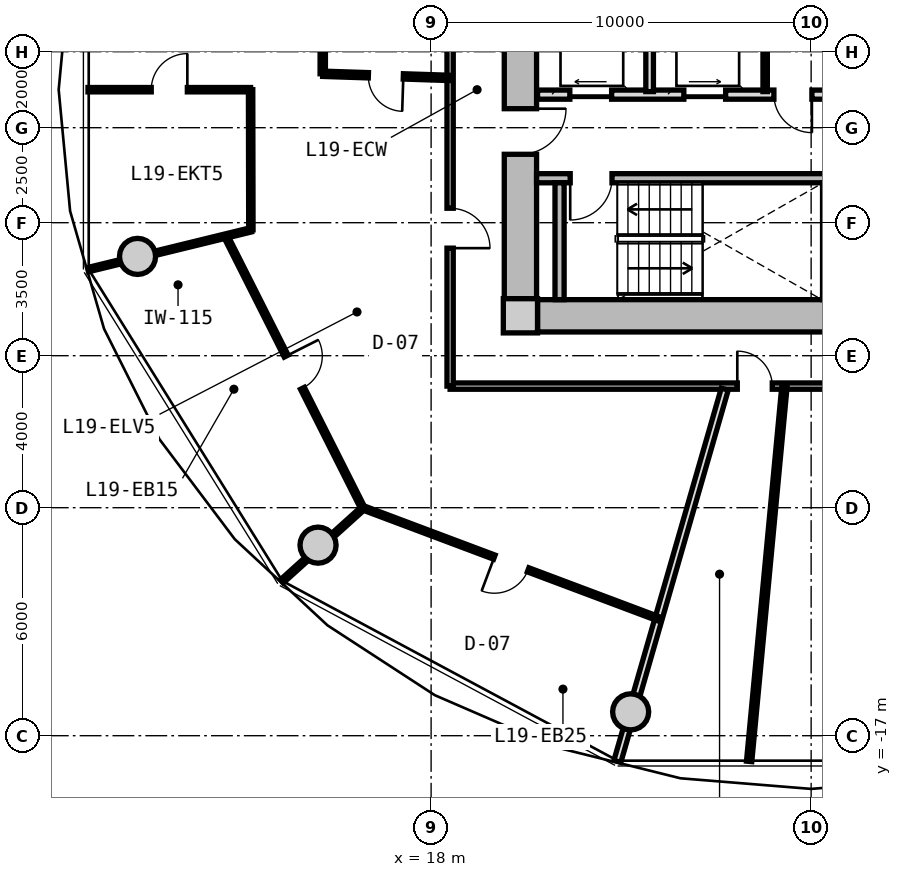
"""IFC4 building model, lengths in metres.
Left out: names, types, materials, properties, quantities, classifications, styles, units other than length and angle.
Written with IfcOpenShell. Run it as: python <this file> out.ifc"""

import sys

from ifc_helpers import new_model, si_unit, direction, frame, frame_2d, origin, origin_2d, place, context, subcontext, project, spatial, rectangle, circle, extrude, source, transform, mapped, element, fill, save


model = new_model("IFC4")
c1 = context("Model", 3, precision=1e-05, world=origin(), true_north=direction((0.0, 1.0)))
c2 = subcontext(c1, "Body", "Model", "MODEL_VIEW")
j1 = project(units=[si_unit("LENGTHUNIT", "METRE"), si_unit("PLANEANGLEUNIT", "RADIAN")], contexts=[c1])
p1 = place(None, origin())
s1 = spatial("IfcSite", under=j1, at=p1, CompositionType="ELEMENT")
p2 = place(p1, origin())
s2 = spatial("IfcBuilding", under=s1, at=p2, CompositionType="ELEMENT")
p3 = place(p2, frame((0.0, 0.0, 64.3)))
s3 = spatial("IfcBuildingStorey", under=s2, at=p3, CompositionType="ELEMENT", Elevation=64.3)
m1 = source(origin(), c2, "Body", "SweptSolid", [
    extrude(rectangle(XDim=0.9, YDim=0.9, at=origin_2d()), origin(), (0.0, 0.0, 1.0), 3.05),
])
p4 = place(p3, frame((20.35, -5.95, 0.0), z_axis=(0.0, 0.0, 1.0), x_axis=(1.0, 0.0, 0.0)))
e1 = element("IfcColumn", 1, at=p4, inside=s3, PredefinedType="COLUMN", context=c2, shape_type="MappedRepresentation", body=[
    mapped(m1, transform((0.0, 0.0, 0.0), x_axis=(1.0, 0.0, 0.0), y_axis=(0.0, 1.0, 0.0), z_axis=(0.0, 0.0, 1.0), scale=1.0)),
])
m2 = source(origin(), c2, "Body", "SweptSolid", [
    extrude(rectangle(XDim=14.4, YDim=0.85, at=frame_2d((7.2, 0.0))), origin(), (0.0, 0.0, 1.0), 2.79),
])
p5 = place(p3, frame((35.2, -5.95, 0.0), z_axis=(0.0, 0.0, 1.0), x_axis=(-1.0, 0.0, 0.0)))
e2 = element("IfcWall", 2, at=p5, inside=s3, PredefinedType="SHEAR", context=c2, shape_type="MappedRepresentation", body=[
    mapped(m2, transform((0.0, 0.0, 0.0), x_axis=(1.0, 0.0, 0.0), y_axis=(0.0, 1.0, 0.0), z_axis=(0.0, 0.0, 1.0), scale=1.0)),
])
m3 = source(origin(), c2, "Body", "SweptSolid", [
    extrude(rectangle(XDim=11.0, YDim=0.85, at=frame_2d((5.5, 0.0))), origin(), (0.0, 0.0, 1.0), 2.79),
])
p6 = place(p3, frame((20.35, -5.5, 0.0), z_axis=(0.0, 0.0, 1.0), x_axis=(0.0, 1.0, 0.0)))
e3 = element("IfcWall", 3, at=p6, inside=s3, PredefinedType="SHEAR", context=c2, shape_type="MappedRepresentation", body=[
    mapped(m3, transform((0.0, 0.0, 0.0), x_axis=(1.0, 0.0, 0.0), y_axis=(0.0, 1.0, 0.0), z_axis=(0.0, 0.0, 1.0), scale=1.0)),
])
p7 = place(p6, frame((3.8, 0.0, 0.0)))
e4 = element("IfcOpeningElement", 4, at=p7, cuts=e3, PredefinedType="OPENING", context=c2, shape_type="SweptSolid", body=[
    extrude(rectangle(XDim=1.2, YDim=2.15, at=frame_2d((0.6, 1.075))), frame((0.0, 0.435, 0.0), z_axis=(0.0, -1.0, 0.0), x_axis=(1.0, 0.0, 0.0)), (0.0, 0.0, 1.0), 0.87),
])
m4 = source(origin(), c2, "Body", "SweptSolid", [
    extrude(circle(Radius=0.475, at=origin_2d()), origin(), (0.0, 0.0, 1.0), 3.05),
])
for number, where, z_axis, x_axis in (
    (5, (10.275, -4.387, 0.0), (0.0, 0.0, 1.0), (1.0, 0.0, 0.0)),
    (6, (15.025, -11.985, 0.0), (0.0, 0.0, 1.0), (1.0, 0.0, 0.0)),
    (7, (23.251, -16.373, 0.0), (0.0, 0.0, 1.0), (1.0, 0.0, 0.0)),
):
    element("IfcColumn", number, at=place(p3, frame(where, z_axis=z_axis, x_axis=x_axis)), inside=s3, PredefinedType="COLUMN", context=c2, shape_type="MappedRepresentation", body=[
        mapped(m4, transform((0.0, 0.0, 0.0), x_axis=(1.0, 0.0, 0.0), y_axis=(0.0, 1.0, 0.0), z_axis=(0.0, 0.0, 1.0), scale=1.0)),
    ])
m5 = source(origin(), c2, "Body", "SweptSolid", [
    extrude(rectangle(XDim=7.765, YDim=0.24, at=frame_2d((3.883, 0.0))), origin(), (0.0, 0.0, 1.0), 2.79),
])
p8 = place(p3, frame((20.775, -2.33, 0.0), z_axis=(0.0, 0.0, 1.0), x_axis=(1.0, 0.0, 0.0)))
e8 = element("IfcWall", 8, at=p8, inside=s3, PredefinedType="PARTITIONING", context=c2, shape_type="MappedRepresentation", body=[
    mapped(m5, transform((0.0, 0.0, 0.0), x_axis=(1.0, 0.0, 0.0), y_axis=(0.0, 1.0, 0.0), z_axis=(0.0, 0.0, 1.0), scale=1.0)),
])
p9 = place(p8, frame((0.885, 0.0, 0.0)))
e9 = element("IfcOpeningElement", 9, at=p9, cuts=e8, PredefinedType="OPENING", context=c2, shape_type="SweptSolid", body=[
    extrude(rectangle(XDim=1.1, YDim=2.15, at=frame_2d((0.55, 1.075))), frame((0.0, 0.13, 0.0), z_axis=(0.0, -1.0, 0.0), x_axis=(1.0, 0.0, 0.0)), (0.0, 0.0, 1.0), 0.26),
])
m6 = source(origin(), c2, "Body", "SweptSolid", [
    extrude(rectangle(XDim=3.075, YDim=0.24, at=frame_2d((1.538, 0.0))), origin(), (0.0, 0.0, 1.0), 2.79),
])
p10 = place(p3, frame((21.38, -5.525, 0.0), z_axis=(0.0, 0.0, 1.0), x_axis=(0.0, 1.0, 0.0)))
e10 = element("IfcWall", 10, at=p10, inside=s3, PredefinedType="PARTITIONING", context=c2, shape_type="MappedRepresentation", body=[
    mapped(m6, transform((0.0, 0.0, 0.0), x_axis=(1.0, 0.0, 0.0), y_axis=(0.0, 1.0, 0.0), z_axis=(0.0, 0.0, 1.0), scale=1.0)),
])
m7 = source(origin(), c2, "Body", "SweptSolid", [
    extrude(rectangle(XDim=7.62, YDim=0.24, at=frame_2d((3.81, 0.0))), origin(), (0.0, 0.0, 1.0), 2.775),
])
p11 = place(p3, frame((20.8, -0.13, 0.0), z_axis=(0.0, 0.0, 1.0), x_axis=(1.0, 0.0, 0.0)))
e11 = element("IfcWall", 11, at=p11, inside=s3, PredefinedType="PARTITIONING", context=c2, shape_type="MappedRepresentation", body=[
    mapped(m7, transform((0.0, 0.0, 0.0), x_axis=(1.0, 0.0, 0.0), y_axis=(0.0, 1.0, 0.0), z_axis=(0.0, 0.0, 1.0), scale=1.0)),
])
p12 = place(p11, frame((6.22, 0.0, 0.0)))
e12 = element("IfcOpeningElement", 12, at=p12, cuts=e11, PredefinedType="OPENING", context=c2, shape_type="SweptSolid", body=[
    extrude(rectangle(XDim=1.0, YDim=2.1, at=frame_2d((0.5, 1.05))), frame((0.0, 0.13, 0.0), z_axis=(0.0, -1.0, 0.0), x_axis=(1.0, 0.0, 0.0)), (0.0, 0.0, 1.0), 0.26),
])
p13 = place(p11, frame((0.85, 0.0, 0.0)))
e13 = element("IfcOpeningElement", 13, at=p13, cuts=e11, PredefinedType="OPENING", context=c2, shape_type="SweptSolid", body=[
    extrude(rectangle(XDim=1.1, YDim=2.2, at=frame_2d((0.55, 1.1))), frame((0.0, 0.13, 0.0), z_axis=(0.0, -1.0, 0.0), x_axis=(1.0, 0.0, 0.0)), (0.0, 0.0, 1.0), 0.26),
])
p14 = place(p11, frame((3.85, 0.0, 0.0)))
e14 = element("IfcOpeningElement", 14, at=p14, cuts=e11, PredefinedType="OPENING", context=c2, shape_type="SweptSolid", body=[
    extrude(rectangle(XDim=1.1, YDim=2.2, at=frame_2d((0.55, 1.1))), frame((0.0, 0.13, 0.0), z_axis=(0.0, -1.0, 0.0), x_axis=(1.0, 0.0, 0.0)), (0.0, 0.0, 1.0), 0.26),
])
m8 = source(origin(), c2, "Body", "SweptSolid", [
    extrude(rectangle(XDim=2.33, YDim=0.115, at=frame_2d((1.165, 0.0))), origin(), (0.0, 0.0, 1.0), 2.775),
])
p15 = place(p3, frame((26.79, -0.05, 0.0), z_axis=(0.0, 0.0, 1.0), x_axis=(0.0, 1.0, 0.0)))
e15 = element("IfcWall", 15, at=p15, inside=s3, PredefinedType="PARTITIONING", context=c2, shape_type="MappedRepresentation", body=[
    mapped(m8, transform((0.0, 0.0, 0.0), x_axis=(1.0, 0.0, 0.0), y_axis=(0.0, 1.0, 0.0), z_axis=(0.0, 0.0, 1.0), scale=1.0)),
])
m9 = source(origin(), c2, "Body", "SweptSolid", [
    extrude(rectangle(XDim=2.33, YDim=0.2, at=frame_2d((1.165, 0.0))), origin(), (0.0, 0.0, 1.0), 2.775),
])
p16 = place(p3, frame((23.75, -0.05, 0.0), z_axis=(0.0, 0.0, 1.0), x_axis=(0.0, 1.0, 0.0)))
e16 = element("IfcWall", 16, at=p16, inside=s3, PredefinedType="PARTITIONING", context=c2, shape_type="MappedRepresentation", body=[
    mapped(m9, transform((0.0, 0.0, 0.0), x_axis=(1.0, 0.0, 0.0), y_axis=(0.0, 1.0, 0.0), z_axis=(0.0, 0.0, 1.0), scale=1.0)),
])
m10 = source(origin(), c2, "Body", "SweptSolid", [
    extrude(rectangle(XDim=19.0, YDim=0.165, at=frame_2d((9.5, 0.0))), origin(), (0.0, 0.0, 1.0), 2.775),
])
p17 = place(p3, frame((37.5, -7.8, 0.0), z_axis=(0.0, 0.0, 1.0), x_axis=(-1.0, 0.0, 0.0)))
e17 = element("IfcWall", 17, at=p17, inside=s3, PredefinedType="PARTITIONING", context=c2, shape_type="MappedRepresentation", body=[
    mapped(m10, transform((0.0, 0.0, 0.0), x_axis=(1.0, 0.0, 0.0), y_axis=(0.0, 1.0, 0.0), z_axis=(0.0, 0.0, 1.0), scale=1.0)),
])
p18 = place(p17, frame((10.523, 0.0, 0.0)))
e18 = element("IfcOpeningElement", 18, at=p18, cuts=e17, PredefinedType="OPENING", context=c2, shape_type="SweptSolid", body=[
    extrude(rectangle(XDim=0.92, YDim=2.1, at=frame_2d((0.46, 1.05))), frame((0.0, 0.093, 0.0), z_axis=(0.0, -1.0, 0.0), x_axis=(1.0, 0.0, 0.0)), (0.0, 0.0, 1.0), 0.185),
])
p19 = place(p17, frame((8.226, 0.0, 0.0)))
e19 = element("IfcOpeningElement", 19, at=p19, cuts=e17, PredefinedType="OPENING", context=c2, shape_type="SweptSolid", body=[
    extrude(rectangle(XDim=0.92, YDim=2.1, at=frame_2d((0.46, 1.05))), frame((0.0, 0.093, 0.0), z_axis=(0.0, -1.0, 0.0), x_axis=(1.0, 0.0, 0.0)), (0.0, 0.0, 1.0), 0.185),
])
m11 = source(origin(), c2, "Body", "SweptSolid", [
    extrude(rectangle(XDim=15.6, YDim=0.165, at=frame_2d((7.8, 0.0))), origin(), (0.0, 0.0, 1.0), 2.775),
])
p20 = place(p3, frame((18.5, -7.8, 0.0), z_axis=(0.0, 0.0, 1.0), x_axis=(0.0, 1.0, 0.0)))
e20 = element("IfcWall", 20, at=p20, inside=s3, PredefinedType="PARTITIONING", context=c2, shape_type="MappedRepresentation", body=[
    mapped(m11, transform((0.0, 0.0, 0.0), x_axis=(1.0, 0.0, 0.0), y_axis=(0.0, 1.0, 0.0), z_axis=(0.0, 0.0, 1.0), scale=1.0)),
])
p21 = place(p20, frame((3.63, 0.0, 0.0)))
e21 = element("IfcOpeningElement", 21, at=p21, cuts=e20, PredefinedType="OPENING", context=c2, shape_type="SweptSolid", body=[
    extrude(rectangle(XDim=1.05, YDim=2.15, at=frame_2d((0.525, 1.075))), frame((0.0, 0.093, 0.0), z_axis=(0.0, -1.0, 0.0), x_axis=(1.0, 0.0, 0.0)), (0.0, 0.0, 1.0), 0.185),
])
m12 = source(origin(), c2, "Body", "SweptSolid", [
    extrude(rectangle(XDim=10.196, YDim=0.19, at=frame_2d((5.098, 0.0))), origin(), (0.0, 0.0, 1.0), 2.225),
])
p22 = place(p3, frame((25.727, -7.88, 0.0), z_axis=(0.0, 0.0, 1.0), x_axis=(-0.277136420347, -0.960830580549, 0.0)))
e22 = element("IfcWall", 22, at=p22, inside=s3, PredefinedType="PARTITIONING", context=c2, shape_type="MappedRepresentation", body=[
    mapped(m12, transform((0.0, 0.0, 0.0), x_axis=(1.0, 0.0, 0.0), y_axis=(0.0, 1.0, 0.0), z_axis=(0.0, 0.0, 1.0), scale=1.0)),
])
m13 = source(origin(), c2, "Body", "SweptSolid", [
    extrude(rectangle(XDim=8.018, YDim=0.115, at=frame_2d((4.009, 0.0))), origin(), (0.0, 0.0, 1.0), 2.775),
])
p23 = place(p3, frame((12.596, -3.854, 0.0), z_axis=(0.0, 0.0, 1.0), x_axis=(0.450134355233, -0.89296084026, 0.0)))
e23 = element("IfcWall", 23, at=p23, inside=s3, PredefinedType="PARTITIONING", context=c2, shape_type="MappedRepresentation", body=[
    mapped(m13, transform((0.0, 0.0, 0.0), x_axis=(1.0, 0.0, 0.0), y_axis=(0.0, 1.0, 0.0), z_axis=(0.0, 0.0, 1.0), scale=1.0)),
])
p24 = place(p23, frame((3.534, 0.0, 0.0)))
e24 = element("IfcOpeningElement", 24, at=p24, cuts=e23, PredefinedType="OPENING", context=c2, shape_type="SweptSolid", body=[
    extrude(rectangle(XDim=0.95, YDim=2.1, at=frame_2d((0.475, 1.05))), frame((0.0, 0.067, 0.0), z_axis=(0.0, -1.0, 0.0), x_axis=(1.0, 0.0, 0.0)), (0.0, 0.0, 1.0), 0.135),
])
m14 = source(origin(), c2, "Body", "SweptSolid", [
    extrude(rectangle(XDim=4.414, YDim=0.115, at=frame_2d((2.207, 0.0))), origin(), (0.0, 0.0, 1.0), 2.225),
])
p25 = place(p3, frame((13.259, -3.688, 0.0), z_axis=(0.0, 0.0, 1.0), x_axis=(-0.971401274504, -0.237443812073, 0.0)))
e25 = element("IfcWall", 25, at=p25, inside=s3, PredefinedType="PARTITIONING", context=c2, shape_type="MappedRepresentation", body=[
    mapped(m14, transform((0.0, 0.0, 0.0), x_axis=(1.0, 0.0, 0.0), y_axis=(0.0, 1.0, 0.0), z_axis=(0.0, 0.0, 1.0), scale=1.0)),
])
m15 = source(origin(), c2, "Body", "SweptSolid", [
    extrude(rectangle(XDim=8.32, YDim=0.115, at=frame_2d((4.16, 0.0))), origin(), (0.0, 0.0, 1.0), 2.775),
])
p26 = place(p3, frame((16.214, -11.006, 0.0), z_axis=(0.0, 0.0, 1.0), x_axis=(0.936180763098, -0.351518959382, 0.0)))
e26 = element("IfcWall", 26, at=p26, inside=s3, PredefinedType="PARTITIONING", context=c2, shape_type="MappedRepresentation", body=[
    mapped(m15, transform((0.0, 0.0, 0.0), x_axis=(1.0, 0.0, 0.0), y_axis=(0.0, 1.0, 0.0), z_axis=(0.0, 0.0, 1.0), scale=1.0)),
])
p27 = place(p26, frame((3.685, 0.0, 0.0)))
e27 = element("IfcOpeningElement", 27, at=p27, cuts=e26, PredefinedType="OPENING", context=c2, shape_type="SweptSolid", body=[
    extrude(rectangle(XDim=0.95, YDim=2.1, at=frame_2d((0.475, 1.05))), frame((0.0, 0.067, 0.0), z_axis=(0.0, -1.0, 0.0), x_axis=(1.0, 0.0, 0.0)), (0.0, 0.0, 1.0), 0.135),
])
m16 = source(origin(), c2, "Body", "SweptSolid", [
    extrude(rectangle(XDim=2.887, YDim=0.115, at=frame_2d((1.444, 0.0))), origin(), (0.0, 0.0, 1.0), 2.225),
])
p28 = place(p3, frame((16.214, -11.006, 0.0), z_axis=(0.0, 0.0, 1.0), x_axis=(-0.742448503307, -0.669903142205, 0.0)))
e28 = element("IfcWall", 28, at=p28, inside=s3, PredefinedType="PARTITIONING", context=c2, shape_type="MappedRepresentation", body=[
    mapped(m16, transform((0.0, 0.0, 0.0), x_axis=(1.0, 0.0, 0.0), y_axis=(0.0, 1.0, 0.0), z_axis=(0.0, 0.0, 1.0), scale=1.0)),
])
m17 = source(origin(), c2, "Body", "SweptSolid", [
    extrude(rectangle(XDim=3.323, YDim=0.14, at=frame_2d((1.662, 0.0))), origin(), (0.0, 0.0, 1.0), 2.775),
])
p29 = place(p3, frame((18.47, 0.311, 0.0), z_axis=(0.0, 0.0, 1.0), x_axis=(-0.999467979553, 0.032615300817, 0.0)))
e29 = element("IfcWall", 29, at=p29, inside=s3, PredefinedType="PARTITIONING", context=c2, shape_type="MappedRepresentation", body=[
    mapped(m17, transform((0.0, 0.0, 0.0), x_axis=(1.0, 0.0, 0.0), y_axis=(0.0, 1.0, 0.0), z_axis=(0.0, 0.0, 1.0), scale=1.0)),
])
p30 = place(p29, frame((1.202, 0.0, 0.0)))
e30 = element("IfcOpeningElement", 30, at=p30, cuts=e29, PredefinedType="OPENING", context=c2, shape_type="SweptSolid", body=[
    extrude(rectangle(XDim=0.92, YDim=2.1, at=frame_2d((0.46, 1.05))), frame((0.0, 0.08, 0.0), z_axis=(0.0, -1.0, 0.0), x_axis=(1.0, 0.0, 0.0)), (0.0, 0.0, 1.0), 0.16),
])
m18 = source(origin(), c2, "Body", "SweptSolid", [
    extrude(rectangle(XDim=2.795, YDim=0.14, at=frame_2d((1.397, 0.0))), origin(), (0.0, 0.0, 1.0), 2.775),
])
p31 = place(p3, frame((15.148, 0.419, 0.0), z_axis=(0.0, 0.0, 1.0), x_axis=(0.001659531299, 0.999998622977, 0.0)))
e31 = element("IfcWall", 31, at=p31, inside=s3, PredefinedType="PARTITIONING", context=c2, shape_type="MappedRepresentation", body=[
    mapped(m18, transform((0.0, 0.0, 0.0), x_axis=(1.0, 0.0, 0.0), y_axis=(0.0, 1.0, 0.0), z_axis=(0.0, 0.0, 1.0), scale=1.0)),
])
m19 = source(origin(), c2, "Body", "SweptSolid", [
    extrude(rectangle(XDim=4.279, YDim=0.115, at=frame_2d((2.139, 0.0))), origin(), (0.0, 0.0, 1.0), 2.775),
])
p32 = place(p3, frame((13.25, 0.0, 0.0), z_axis=(0.0, 0.0, 1.0), x_axis=(-1.0, 0.0, 0.0)))
e32 = element("IfcWall", 32, at=p32, inside=s3, PredefinedType="PARTITIONING", context=c2, shape_type="MappedRepresentation", body=[
    mapped(m19, transform((0.0, 0.0, 0.0), x_axis=(1.0, 0.0, 0.0), y_axis=(0.0, 1.0, 0.0), z_axis=(0.0, 0.0, 1.0), scale=1.0)),
])
p33 = place(p32, frame((1.664, 0.0, 0.0)))
e33 = element("IfcOpeningElement", 33, at=p33, cuts=e32, PredefinedType="OPENING", context=c2, shape_type="SweptSolid", body=[
    extrude(rectangle(XDim=0.95, YDim=2.1, at=frame_2d((0.475, 1.05))), frame((0.0, 0.067, 0.0), z_axis=(0.0, -1.0, 0.0), x_axis=(1.0, 0.0, 0.0)), (0.0, 0.0, 1.0), 0.135),
])
m20 = source(origin(), c2, "Body", "SweptSolid", [
    extrude(rectangle(XDim=3.689, YDim=0.115, at=frame_2d((1.844, 0.0))), origin(), (0.0, 0.0, 1.0), 2.775),
])
p34 = place(p3, frame((13.25, 0.0, 0.0), z_axis=(0.0, 0.0, 1.0), x_axis=(0.001919382261, -0.999998157984, 0.0)))
e34 = element("IfcWall", 34, at=p34, inside=s3, PredefinedType="PARTITIONING", context=c2, shape_type="MappedRepresentation", body=[
    mapped(m20, transform((0.0, 0.0, 0.0), x_axis=(1.0, 0.0, 0.0), y_axis=(0.0, 1.0, 0.0), z_axis=(0.0, 0.0, 1.0), scale=1.0)),
])
m21 = source(origin(), c2, "Body", "SweptSolid", [
    extrude(rectangle(XDim=9.89, YDim=0.14, at=frame_2d((4.945, 0.0))), origin(), (0.0, 0.0, 1.0), 2.775),
])
p35 = place(p3, frame((27.296, -7.83, 0.0), z_axis=(0.0, 0.0, 1.0), x_axis=(-0.093780403478, -0.995592906726, 0.0)))
e35 = element("IfcWall", 35, at=p35, inside=s3, PredefinedType="PARTITIONING", context=c2, shape_type="MappedRepresentation", body=[
    mapped(m21, transform((0.0, 0.0, 0.0), x_axis=(1.0, 0.0, 0.0), y_axis=(0.0, 1.0, 0.0), z_axis=(0.0, 0.0, 1.0), scale=1.0)),
])
m22 = source(origin(), c2, "Body", "SweptSolid", [
    extrude(rectangle(XDim=1.1, YDim=2.15, at=frame_2d((0.55, 1.075))), frame((0.0, 0.025, 0.0), z_axis=(0.0, -1.0, 0.0), x_axis=(1.0, 0.0, 0.0)), (0.0, 0.0, 1.0), 0.05),
])
p36 = place(p9, frame((1.1, 0.0, 0.0), z_axis=(0.0, 0.0, 1.0), x_axis=(-1.0, 0.0, 0.0)))
e36 = element("IfcDoor", 36, at=p36, inside=s3, OperationType="SINGLE_SWING_RIGHT", PredefinedType="DOOR", context=c2, shape_type="MappedRepresentation", body=[
    mapped(m22, transform((0.0, 0.0, 0.0), x_axis=(1.0, 0.0, 0.0), y_axis=(0.0, 1.0, 0.0), z_axis=(0.0, 0.0, 1.0), scale=1.0)),
])
fill(e9, e36)
m23 = source(origin(), c2, "Body", "SweptSolid", [
    extrude(rectangle(XDim=1.2, YDim=2.15, at=frame_2d((0.6, 1.075))), frame((0.0, 0.025, 0.0), z_axis=(0.0, -1.0, 0.0), x_axis=(1.0, 0.0, 0.0)), (0.0, 0.0, 1.0), 0.05),
])
p37 = place(p7, frame((1.2, 0.0, 0.0), z_axis=(0.0, 0.0, 1.0), x_axis=(-1.0, 0.0, 0.0)))
e37 = element("IfcDoor", 37, at=p37, inside=s3, OperationType="SINGLE_SWING_LEFT", PredefinedType="DOOR", context=c2, shape_type="MappedRepresentation", body=[
    mapped(m23, transform((0.0, 0.0, 0.0), x_axis=(1.0, 0.0, 0.0), y_axis=(0.0, 1.0, 0.0), z_axis=(0.0, 0.0, 1.0), scale=1.0)),
])
fill(e4, e37)
m24 = source(origin(), c2, "Body", "SweptSolid", [
    extrude(rectangle(XDim=1.0, YDim=2.1, at=frame_2d((0.5, 1.05))), frame((0.0, 0.025, 0.0), z_axis=(0.0, -1.0, 0.0), x_axis=(1.0, 0.0, 0.0)), (0.0, 0.0, 1.0), 0.05),
])
p38 = place(p12, frame((1.0, 0.0, 0.0), z_axis=(0.0, 0.0, 1.0), x_axis=(-1.0, 0.0, 0.0)))
e38 = element("IfcDoor", 38, at=p38, inside=s3, OperationType="SINGLE_SWING_LEFT", PredefinedType="DOOR", context=c2, shape_type="MappedRepresentation", body=[
    mapped(m24, transform((0.0, 0.0, 0.0), x_axis=(1.0, 0.0, 0.0), y_axis=(0.0, 1.0, 0.0), z_axis=(0.0, 0.0, 1.0), scale=1.0)),
])
fill(e12, e38)
m25 = source(origin(), c2, "Body", "SweptSolid", [
    extrude(rectangle(XDim=1.1, YDim=2.2, at=frame_2d((0.55, 1.1))), frame((0.0, 0.025, 0.0), z_axis=(0.0, -1.0, 0.0), x_axis=(1.0, 0.0, 0.0)), (0.0, 0.0, 1.0), 0.05),
])
p39 = place(p13, origin())
e39 = element("IfcDoor", 39, at=p39, inside=s3, OperationType="SLIDING_TO_LEFT", PredefinedType="DOOR", context=c2, shape_type="MappedRepresentation", body=[
    mapped(m25, transform((0.0, 0.0, 0.0), x_axis=(1.0, 0.0, 0.0), y_axis=(0.0, 1.0, 0.0), z_axis=(0.0, 0.0, 1.0), scale=1.0)),
])
fill(e13, e39)
p40 = place(p14, origin())
e40 = element("IfcDoor", 40, at=p40, inside=s3, OperationType="SLIDING_TO_RIGHT", PredefinedType="DOOR", context=c2, shape_type="MappedRepresentation", body=[
    mapped(m25, transform((0.0, 0.0, 0.0), x_axis=(1.0, 0.0, 0.0), y_axis=(0.0, 1.0, 0.0), z_axis=(0.0, 0.0, 1.0), scale=1.0)),
])
fill(e14, e40)
m26 = source(origin(), c2, "Body", "SweptSolid", [
    extrude(rectangle(XDim=1.05, YDim=2.15, at=frame_2d((0.525, 1.075))), frame((0.0, 0.025, 0.0), z_axis=(0.0, -1.0, 0.0), x_axis=(1.0, 0.0, 0.0)), (0.0, 0.0, 1.0), 0.05),
])
p41 = place(p21, frame((1.05, 0.0, 0.0), z_axis=(0.0, 0.0, 1.0), x_axis=(-1.0, 0.0, 0.0)))
e41 = element("IfcDoor", 41, at=p41, inside=s3, OperationType="SINGLE_SWING_RIGHT", PredefinedType="DOOR", context=c2, shape_type="MappedRepresentation", body=[
    mapped(m26, transform((0.0, 0.0, 0.0), x_axis=(1.0, 0.0, 0.0), y_axis=(0.0, 1.0, 0.0), z_axis=(0.0, 0.0, 1.0), scale=1.0)),
])
fill(e21, e41)
m27 = source(origin(), c2, "Body", "SweptSolid", [
    extrude(rectangle(XDim=0.92, YDim=2.1, at=frame_2d((0.46, 1.05))), frame((0.0, 0.025, 0.0), z_axis=(0.0, -1.0, 0.0), x_axis=(1.0, 0.0, 0.0)), (0.0, 0.0, 1.0), 0.05),
])
p42 = place(p30, origin())
e42 = element("IfcDoor", 42, at=p42, inside=s3, OperationType="SINGLE_SWING_LEFT", PredefinedType="DOOR", context=c2, shape_type="MappedRepresentation", body=[
    mapped(m27, transform((0.0, 0.0, 0.0), x_axis=(1.0, 0.0, 0.0), y_axis=(0.0, 1.0, 0.0), z_axis=(0.0, 0.0, 1.0), scale=1.0)),
])
fill(e30, e42)
m28 = source(origin(), c2, "Body", "SweptSolid", [
    extrude(rectangle(XDim=0.95, YDim=2.1, at=frame_2d((0.475, 1.05))), frame((0.0, 0.025, 0.0), z_axis=(0.0, -1.0, 0.0), x_axis=(1.0, 0.0, 0.0)), (0.0, 0.0, 1.0), 0.05),
])
p43 = place(p33, frame((0.95, 0.0, 0.0), z_axis=(0.0, 0.0, 1.0), x_axis=(-1.0, 0.0, 0.0)))
e43 = element("IfcDoor", 43, at=p43, inside=s3, OperationType="SINGLE_SWING_RIGHT", PredefinedType="DOOR", context=c2, shape_type="MappedRepresentation", body=[
    mapped(m28, transform((0.0, 0.0, 0.0), x_axis=(1.0, 0.0, 0.0), y_axis=(0.0, 1.0, 0.0), z_axis=(0.0, 0.0, 1.0), scale=1.0)),
])
fill(e33, e43)
p44 = place(p24, origin())
e44 = element("IfcDoor", 44, at=p44, inside=s3, OperationType="SINGLE_SWING_LEFT", PredefinedType="DOOR", context=c2, shape_type="MappedRepresentation", body=[
    mapped(m28, transform((0.0, 0.0, 0.0), x_axis=(1.0, 0.0, 0.0), y_axis=(0.0, 1.0, 0.0), z_axis=(0.0, 0.0, 1.0), scale=1.0)),
])
fill(e24, e44)
p45 = place(p27, frame((0.95, 0.0, 0.0), z_axis=(0.0, 0.0, 1.0), x_axis=(-1.0, 0.0, 0.0)))
e45 = element("IfcDoor", 45, at=p45, inside=s3, OperationType="SINGLE_SWING_RIGHT", PredefinedType="DOOR", context=c2, shape_type="MappedRepresentation", body=[
    mapped(m28, transform((0.0, 0.0, 0.0), x_axis=(1.0, 0.0, 0.0), y_axis=(0.0, 1.0, 0.0), z_axis=(0.0, 0.0, 1.0), scale=1.0)),
])
fill(e27, e45)
p46 = place(p18, frame((0.92, 0.0, 0.0), z_axis=(0.0, 0.0, 1.0), x_axis=(-1.0, 0.0, 0.0)))
e46 = element("IfcDoor", 46, at=p46, inside=s3, OperationType="SINGLE_SWING_LEFT", PredefinedType="DOOR", context=c2, shape_type="MappedRepresentation", body=[
    mapped(m27, transform((0.0, 0.0, 0.0), x_axis=(1.0, 0.0, 0.0), y_axis=(0.0, 1.0, 0.0), z_axis=(0.0, 0.0, 1.0), scale=1.0)),
])
fill(e18, e46)
save(model, sys.argv[1])
